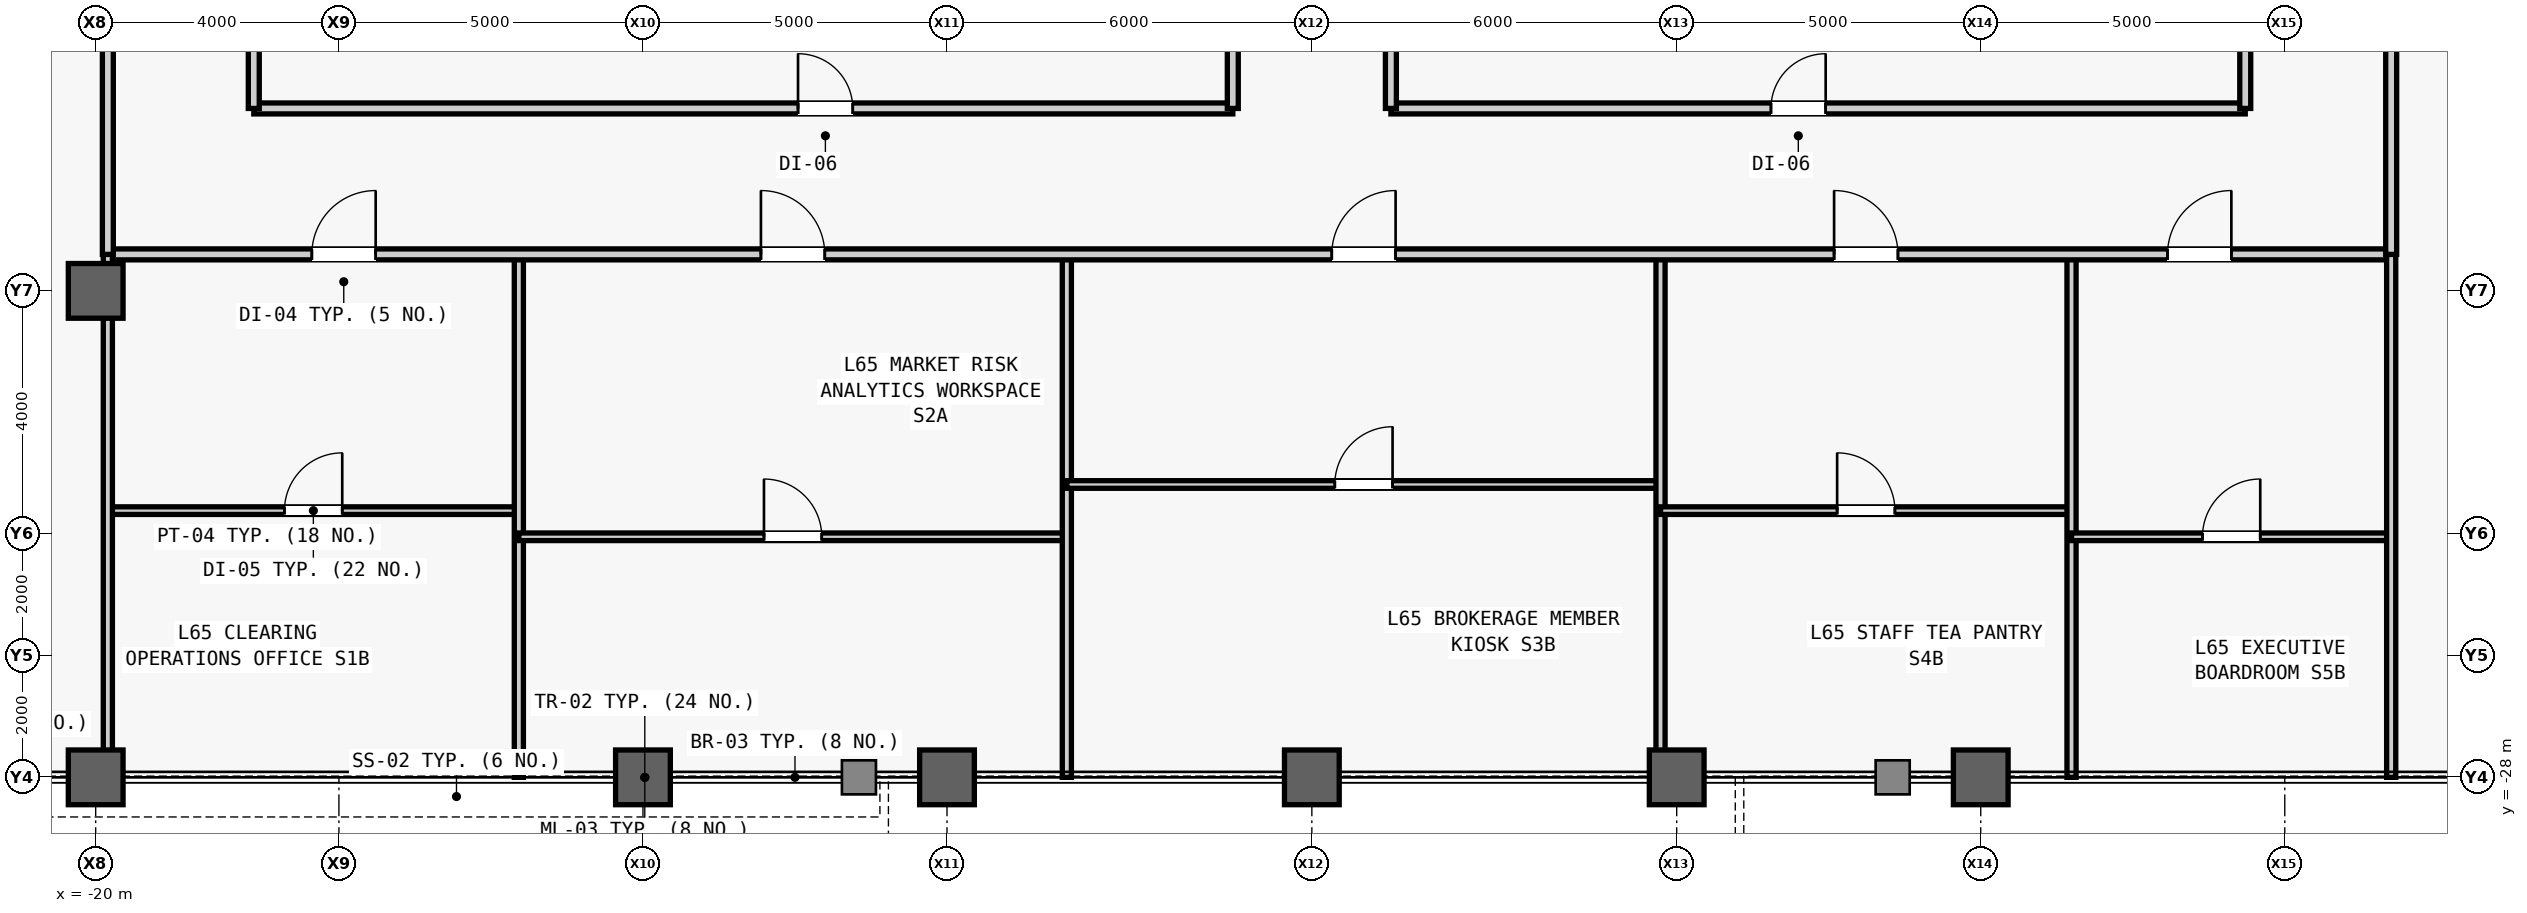
"""IFC4 building model, lengths in metres.
Left out: names, types, materials, properties, quantities, classifications, styles, units other than length and angle.
Written with IfcOpenShell. Run it as: python <this file> out.ifc"""

import sys

from ifc_helpers import new_model, si_unit, direction, frame, frame_2d, origin, origin_2d, place, context, subcontext, project, spatial, rectangle, hollow_rectangle, extrude, source, transform, mapped, element, fill, save


model = new_model("IFC4")
c1 = context("Model", 3, precision=1e-05, world=origin(), true_north=direction((0.0, 1.0)))
c2 = subcontext(c1, "Body", "Model", "MODEL_VIEW")
j1 = project(units=[si_unit("LENGTHUNIT", "METRE"), si_unit("PLANEANGLEUNIT", "RADIAN")], contexts=[c1])
p1 = place(None, origin())
s1 = spatial("IfcSite", under=j1, at=p1, CompositionType="ELEMENT")
p2 = place(p1, origin())
s2 = spatial("IfcBuilding", under=s1, at=p2, CompositionType="ELEMENT")
p3 = place(p2, frame((0.0, 0.0, 277.5)))
s3 = spatial("IfcBuildingStorey", under=s2, at=p3, CompositionType="ELEMENT", Elevation=277.5)
m1 = source(origin(), c2, "Body", "SweptSolid", [
    extrude(hollow_rectangle(XDim=0.9, YDim=0.9, WallThickness=0.05, at=origin_2d()), origin(), (0.0, 0.0, 1.0), 4.0),
])
for number, where, z_axis, x_axis in (
    (1, (-20.0, -28.0, 0.0), (0.0, 0.0, 1.0), (1.0, 0.0, 0.0)),
    (2, (-20.0, -20.0, 0.0), (0.0, 0.0, 1.0), (1.0, 0.0, 0.0)),
    (3, (-11.0, -28.0, 0.0), (0.0, 0.0, 1.0), (1.0, 0.0, 0.0)),
    (4, (-6.0, -28.0, 0.0), (0.0, 0.0, 1.0), (1.0, 0.0, 0.0)),
    (5, (0.0, -28.0, 0.0), (0.0, 0.0, 1.0), (1.0, 0.0, 0.0)),
    (6, (6.0, -28.0, 0.0), (0.0, 0.0, 1.0), (1.0, 0.0, 0.0)),
    (7, (11.0, -28.0, 0.0), (0.0, 0.0, 1.0), (1.0, 0.0, 0.0)),
):
    element("IfcColumn", number, at=place(p3, frame(where, z_axis=z_axis, x_axis=x_axis)), inside=s3, PredefinedType="COLUMN", context=c2, shape_type="MappedRepresentation", body=[
        mapped(m1, transform((0.0, 0.0, 0.0), scale=1.0)),
    ])
m2 = source(origin(), c2, "Body", "SweptSolid", [
    extrude(rectangle(XDim=16.1, YDim=0.18, at=frame_2d((8.05, 0.0))), origin(), (0.0, 0.0, 1.0), 3.78),
])
p4 = place(p3, frame((-17.4, -17.0, 0.0), z_axis=(0.0, 0.0, 1.0), x_axis=(1.0, 0.0, 0.0)))
e8 = element("IfcWall", 8, at=p4, inside=s3, PredefinedType="PARTITIONING", context=c2, shape_type="MappedRepresentation", body=[
    mapped(m2, transform((0.0, 0.0, 0.0), scale=1.0)),
])
m3 = source(origin(), c2, "Body", "SweptSolid", [
    extrude(rectangle(XDim=0.9, YDim=2.15, at=frame_2d((0.45, 1.075))), frame((0.0, 0.1, 0.0), z_axis=(0.0, -1.0, 0.0), x_axis=(1.0, 0.0, 0.0)), (0.0, 0.0, 1.0), 0.2),
])
p5 = place(p4, frame((8.95, 0.0, 0.0)))
e9 = element("IfcOpeningElement", 9, at=p5, cuts=e8, PredefinedType="OPENING", context=c2, shape_type="MappedRepresentation", body=[
    mapped(m3, transform((0.0, 0.0, 0.0), scale=1.0)),
])
m4 = source(origin(), c2, "Body", "SweptSolid", [
    extrude(rectangle(XDim=7.2, YDim=0.18, at=frame_2d((3.6, 0.0))), origin(), (0.0, 0.0, 1.0), 3.78),
])
p6 = place(p3, frame((-17.4, -17.0, 0.0), z_axis=(0.0, 0.0, 1.0), x_axis=(0.0, 1.0, 0.0)))
e10 = element("IfcWall", 10, at=p6, inside=s3, PredefinedType="PARTITIONING", context=c2, shape_type="MappedRepresentation", body=[
    mapped(m4, transform((0.0, 0.0, 0.0), scale=1.0)),
])
m5 = source(origin(), c2, "Body", "SweptSolid", [
    extrude(rectangle(XDim=6.0, YDim=0.18, at=frame_2d((3.0, 0.0))), origin(), (0.0, 0.0, 1.0), 3.78),
])
p7 = place(p3, frame((-1.3, -17.0, 0.0), z_axis=(0.0, 0.0, 1.0), x_axis=(0.0, 1.0, 0.0)))
e11 = element("IfcWall", 11, at=p7, inside=s3, PredefinedType="PARTITIONING", context=c2, shape_type="MappedRepresentation", body=[
    mapped(m5, transform((0.0, 0.0, 0.0), scale=1.0)),
])
m6 = source(origin(), c2, "Body", "SweptSolid", [
    extrude(rectangle(XDim=14.05, YDim=0.18, at=frame_2d((7.025, 0.0))), origin(), (0.0, 0.0, 1.0), 3.78),
])
p8 = place(p3, frame((1.3, -17.0, 0.0), z_axis=(0.0, 0.0, 1.0), x_axis=(1.0, 0.0, 0.0)))
e12 = element("IfcWall", 12, at=p8, inside=s3, PredefinedType="PARTITIONING", context=c2, shape_type="MappedRepresentation", body=[
    mapped(m6, transform((0.0, 0.0, 0.0), scale=1.0)),
])
p9 = place(p8, frame((6.25, 0.0, 0.0)))
e13 = element("IfcOpeningElement", 13, at=p9, cuts=e12, PredefinedType="OPENING", context=c2, shape_type="MappedRepresentation", body=[
    mapped(m3, transform((0.0, 0.0, 0.0), scale=1.0)),
])
p10 = place(p3, frame((1.3, -17.0, 0.0), z_axis=(0.0, 0.0, 1.0), x_axis=(0.0, 1.0, 0.0)))
e14 = element("IfcWall", 14, at=p10, inside=s3, PredefinedType="PARTITIONING", context=c2, shape_type="MappedRepresentation", body=[
    mapped(m5, transform((0.0, 0.0, 0.0), scale=1.0)),
])
m7 = source(origin(), c2, "Body", "SweptSolid", [
    extrude(rectangle(XDim=6.5, YDim=0.18, at=frame_2d((3.25, 0.0))), origin(), (0.0, 0.0, 1.0), 3.78),
])
p11 = place(p3, frame((15.35, -17.0, 0.0), z_axis=(0.0, 0.0, 1.0), x_axis=(0.0, 1.0, 0.0)))
e15 = element("IfcWall", 15, at=p11, inside=s3, PredefinedType="PARTITIONING", context=c2, shape_type="MappedRepresentation", body=[
    mapped(m7, transform((0.0, 0.0, 0.0), scale=1.0)),
])
m8 = source(origin(), c2, "Body", "SweptSolid", [
    extrude(rectangle(XDim=6.759, YDim=0.125, at=frame_2d((3.379, 0.0))), origin(), (0.0, 0.0, 1.0), 3.78),
])
p12 = place(p3, frame((-19.8, -23.614, 0.0), z_axis=(0.0, 0.0, 1.0), x_axis=(1.0, 0.0, 0.0)))
e16 = element("IfcWall", 16, at=p12, inside=s3, PredefinedType="PARTITIONING", context=c2, shape_type="MappedRepresentation", body=[
    mapped(m8, transform((0.0, 0.0, 0.0), scale=1.0)),
])
m9 = source(origin(), c2, "Body", "SweptSolid", [
    extrude(rectangle(XDim=0.95, YDim=2.15, at=frame_2d((0.475, 1.075))), frame((0.0, 0.073, 0.0), z_axis=(0.0, -1.0, 0.0), x_axis=(1.0, 0.0, 0.0)), (0.0, 0.0, 1.0), 0.145),
])
p13 = place(p12, frame((2.905, 0.0, 0.0)))
e17 = element("IfcOpeningElement", 17, at=p13, cuts=e16, PredefinedType="OPENING", context=c2, shape_type="MappedRepresentation", body=[
    mapped(m9, transform((0.0, 0.0, 0.0), scale=1.0)),
])
m10 = source(origin(), c2, "Body", "SweptSolid", [
    extrude(rectangle(XDim=8.6, YDim=0.15, at=frame_2d((4.3, 0.0))), origin(), (0.0, 0.0, 1.0), 3.78),
])
p14 = place(p3, frame((-13.041, -28.0, 0.0), z_axis=(0.0, 0.0, 1.0), x_axis=(0.0, 1.0, 0.0)))
e18 = element("IfcWall", 18, at=p14, inside=s3, PredefinedType="PARTITIONING", context=c2, shape_type="MappedRepresentation", body=[
    mapped(m10, transform((0.0, 0.0, 0.0), scale=1.0)),
])
m11 = source(origin(), c2, "Body", "SweptSolid", [
    extrude(rectangle(XDim=9.012, YDim=0.125, at=frame_2d((4.506, 0.0))), origin(), (0.0, 0.0, 1.0), 3.78),
])
p15 = place(p3, frame((-13.041, -24.044, 0.0), z_axis=(0.0, 0.0, 1.0), x_axis=(1.0, 0.0, 0.0)))
e19 = element("IfcWall", 19, at=p15, inside=s3, PredefinedType="PARTITIONING", context=c2, shape_type="MappedRepresentation", body=[
    mapped(m11, transform((0.0, 0.0, 0.0), scale=1.0)),
])
p16 = place(p15, frame((4.031, 0.0, 0.0)))
e20 = element("IfcOpeningElement", 20, at=p16, cuts=e19, PredefinedType="OPENING", context=c2, shape_type="MappedRepresentation", body=[
    mapped(m9, transform((0.0, 0.0, 0.0), scale=1.0)),
])
p17 = place(p3, frame((-4.029, -28.0, 0.0), z_axis=(0.0, 0.0, 1.0), x_axis=(0.0, 1.0, 0.0)))
e21 = element("IfcWall", 21, at=p17, inside=s3, PredefinedType="PARTITIONING", context=c2, shape_type="MappedRepresentation", body=[
    mapped(m10, transform((0.0, 0.0, 0.0), scale=1.0)),
])
m12 = source(origin(), c2, "Body", "SweptSolid", [
    extrude(rectangle(XDim=9.763, YDim=0.125, at=frame_2d((4.881, 0.0))), origin(), (0.0, 0.0, 1.0), 3.78),
])
p18 = place(p3, frame((-4.029, -23.184, 0.0), z_axis=(0.0, 0.0, 1.0), x_axis=(1.0, 0.0, 0.0)))
e22 = element("IfcWall", 22, at=p18, inside=s3, PredefinedType="PARTITIONING", context=c2, shape_type="MappedRepresentation", body=[
    mapped(m12, transform((0.0, 0.0, 0.0), scale=1.0)),
])
p19 = place(p18, frame((4.406, 0.0, 0.0)))
e23 = element("IfcOpeningElement", 23, at=p19, cuts=e22, PredefinedType="OPENING", context=c2, shape_type="MappedRepresentation", body=[
    mapped(m9, transform((0.0, 0.0, 0.0), scale=1.0)),
])
m13 = source(origin(), c2, "Body", "SweptSolid", [
    extrude(rectangle(XDim=8.6, YDim=0.15, at=frame_2d((4.3, 0.0))), origin(), (0.0, 0.0, 1.0), 3.085),
])
p20 = place(p3, frame((5.734, -28.0, 0.0), z_axis=(0.0, 0.0, 1.0), x_axis=(0.0, 1.0, 0.0)))
e24 = element("IfcWall", 24, at=p20, inside=s3, PredefinedType="PARTITIONING", context=c2, shape_type="MappedRepresentation", body=[
    mapped(m13, transform((0.0, 0.0, 0.0), scale=1.0)),
])
p21 = place(p3, frame((5.734, -23.614, 0.0), z_axis=(0.0, 0.0, 1.0), x_axis=(1.0, 0.0, 0.0)))
e25 = element("IfcWall", 25, at=p21, inside=s3, PredefinedType="PARTITIONING", context=c2, shape_type="MappedRepresentation", body=[
    mapped(m8, transform((0.0, 0.0, 0.0), scale=1.0)),
])
p22 = place(p21, frame((2.905, 0.0, 0.0)))
e26 = element("IfcOpeningElement", 26, at=p22, cuts=e25, PredefinedType="OPENING", context=c2, shape_type="MappedRepresentation", body=[
    mapped(m9, transform((0.0, 0.0, 0.0), scale=1.0)),
])
p23 = place(p3, frame((12.493, -28.0, 0.0), z_axis=(0.0, 0.0, 1.0), x_axis=(0.0, 1.0, 0.0)))
e27 = element("IfcWall", 27, at=p23, inside=s3, PredefinedType="PARTITIONING", context=c2, shape_type="MappedRepresentation", body=[
    mapped(m10, transform((0.0, 0.0, 0.0), scale=1.0)),
])
m14 = source(origin(), c2, "Body", "SweptSolid", [
    extrude(rectangle(XDim=5.257, YDim=0.125, at=frame_2d((2.628, 0.0))), origin(), (0.0, 0.0, 1.0), 3.78),
])
p24 = place(p3, frame((12.493, -24.044, 0.0), z_axis=(0.0, 0.0, 1.0), x_axis=(1.0, 0.0, 0.0)))
e28 = element("IfcWall", 28, at=p24, inside=s3, PredefinedType="PARTITIONING", context=c2, shape_type="MappedRepresentation", body=[
    mapped(m14, transform((0.0, 0.0, 0.0), scale=1.0)),
])
p25 = place(p24, frame((2.154, 0.0, 0.0)))
e29 = element("IfcOpeningElement", 29, at=p25, cuts=e28, PredefinedType="OPENING", context=c2, shape_type="MappedRepresentation", body=[
    mapped(m9, transform((0.0, 0.0, 0.0), scale=1.0)),
])
m15 = source(origin(), c2, "Body", "SweptSolid", [
    extrude(rectangle(XDim=37.55, YDim=0.18, at=frame_2d((18.775, 0.0))), origin(), (0.0, 0.0, 1.0), 3.433),
])
p26 = place(p3, frame((-19.8, -19.4, 0.0), z_axis=(0.0, 0.0, 1.0), x_axis=(1.0, 0.0, 0.0)))
e30 = element("IfcWall", 30, at=p26, inside=s3, PredefinedType="PARTITIONING", context=c2, shape_type="MappedRepresentation", body=[
    mapped(m15, transform((0.0, 0.0, 0.0), scale=1.0)),
])
m16 = source(origin(), c2, "Body", "SweptSolid", [
    extrude(rectangle(XDim=1.05, YDim=2.2, at=frame_2d((0.525, 1.1))), frame((0.0, 0.1, 0.0), z_axis=(0.0, -1.0, 0.0), x_axis=(1.0, 0.0, 0.0)), (0.0, 0.0, 1.0), 0.2),
])
p27 = place(p26, frame((3.354, 0.0, 0.0)))
e31 = element("IfcOpeningElement", 31, at=p27, cuts=e30, PredefinedType="OPENING", context=c2, shape_type="MappedRepresentation", body=[
    mapped(m16, transform((0.0, 0.0, 0.0), scale=1.0)),
])
p28 = place(p26, frame((10.74, 0.0, 0.0)))
e32 = element("IfcOpeningElement", 32, at=p28, cuts=e30, PredefinedType="OPENING", context=c2, shape_type="MappedRepresentation", body=[
    mapped(m16, transform((0.0, 0.0, 0.0), scale=1.0)),
])
p29 = place(p26, frame((20.127, 0.0, 0.0)))
e33 = element("IfcOpeningElement", 33, at=p29, cuts=e30, PredefinedType="OPENING", context=c2, shape_type="MappedRepresentation", body=[
    mapped(m16, transform((0.0, 0.0, 0.0), scale=1.0)),
])
p30 = place(p26, frame((28.388, 0.0, 0.0)))
e34 = element("IfcOpeningElement", 34, at=p30, cuts=e30, PredefinedType="OPENING", context=c2, shape_type="MappedRepresentation", body=[
    mapped(m16, transform((0.0, 0.0, 0.0), scale=1.0)),
])
p31 = place(p26, frame((33.872, 0.0, 0.0)))
e35 = element("IfcOpeningElement", 35, at=p31, cuts=e30, PredefinedType="OPENING", context=c2, shape_type="MappedRepresentation", body=[
    mapped(m16, transform((0.0, 0.0, 0.0), scale=1.0)),
])
m17 = source(origin(), c2, "Body", "SweptSolid", [
    extrude(rectangle(XDim=8.6, YDim=0.15, at=frame_2d((4.3, 0.0))), origin(), (0.0, 0.0, 1.0), 3.164),
])
p32 = place(p3, frame((-19.8, -28.0, 0.0), z_axis=(0.0, 0.0, 1.0), x_axis=(0.0, 1.0, 0.0)))
e36 = element("IfcWall", 36, at=p32, inside=s3, PredefinedType="PARTITIONING", context=c2, shape_type="MappedRepresentation", body=[
    mapped(m17, transform((0.0, 0.0, 0.0), scale=1.0)),
])
p33 = place(p3, frame((17.75, -28.0, 0.0), z_axis=(0.0, 0.0, 1.0), x_axis=(0.0, 1.0, 0.0)))
e37 = element("IfcWall", 37, at=p33, inside=s3, PredefinedType="PARTITIONING", context=c2, shape_type="MappedRepresentation", body=[
    mapped(m10, transform((0.0, 0.0, 0.0), scale=1.0)),
])
m18 = source(origin(), c2, "Body", "SweptSolid", [
    extrude(rectangle(XDim=41.9, YDim=0.18, at=frame_2d((20.95, 0.0))), origin(), (0.0, 0.0, 1.0), 3.164),
])
p34 = place(p3, frame((-19.8, -19.4, 0.0), z_axis=(0.0, 0.0, 1.0), x_axis=(0.0, 1.0, 0.0)))
e38 = element("IfcWall", 38, at=p34, inside=s3, PredefinedType="PARTITIONING", context=c2, shape_type="MappedRepresentation", body=[
    mapped(m18, transform((0.0, 0.0, 0.0), scale=1.0)),
])
m19 = source(origin(), c2, "Body", "SweptSolid", [
    extrude(rectangle(XDim=0.95, YDim=2.15, at=frame_2d((0.475, 1.075))), frame((0.0, 0.1, 0.0), z_axis=(0.0, -1.0, 0.0), x_axis=(1.0, 0.0, 0.0)), (0.0, 0.0, 1.0), 0.2),
])
p35 = place(p34, frame((10.375, 0.0, 0.0)))
e39 = element("IfcOpeningElement", 39, at=p35, cuts=e38, PredefinedType="OPENING", context=c2, shape_type="MappedRepresentation", body=[
    mapped(m19, transform((0.0, 0.0, 0.0), scale=1.0)),
])
p36 = place(p34, frame((26.075, 0.0, 0.0)))
e40 = element("IfcOpeningElement", 40, at=p36, cuts=e38, PredefinedType="OPENING", context=c2, shape_type="MappedRepresentation", body=[
    mapped(m19, transform((0.0, 0.0, 0.0), scale=1.0)),
])
m20 = source(origin(), c2, "Body", "SweptSolid", [
    extrude(rectangle(XDim=41.9, YDim=0.18, at=frame_2d((20.95, 0.0))), origin(), (0.0, 0.0, 1.0), 3.78),
])
p37 = place(p3, frame((17.75, -19.4, 0.0), z_axis=(0.0, 0.0, 1.0), x_axis=(0.0, 1.0, 0.0)))
e41 = element("IfcWall", 41, at=p37, inside=s3, PredefinedType="PARTITIONING", context=c2, shape_type="MappedRepresentation", body=[
    mapped(m20, transform((0.0, 0.0, 0.0), scale=1.0)),
])
p38 = place(p37, frame((5.591, 0.0, 0.0)))
e42 = element("IfcOpeningElement", 42, at=p38, cuts=e41, PredefinedType="OPENING", context=c2, shape_type="MappedRepresentation", body=[
    mapped(m19, transform((0.0, 0.0, 0.0), scale=1.0)),
])
p39 = place(p37, frame((13.247, 0.0, 0.0)))
e43 = element("IfcOpeningElement", 43, at=p39, cuts=e41, PredefinedType="OPENING", context=c2, shape_type="MappedRepresentation", body=[
    mapped(m19, transform((0.0, 0.0, 0.0), scale=1.0)),
])
p40 = place(p37, frame((22.121, 0.0, 0.0)))
e44 = element("IfcOpeningElement", 44, at=p40, cuts=e41, PredefinedType="OPENING", context=c2, shape_type="MappedRepresentation", body=[
    mapped(m19, transform((0.0, 0.0, 0.0), scale=1.0)),
])
p41 = place(p37, frame((29.165, 0.0, 0.0)))
e45 = element("IfcOpeningElement", 45, at=p41, cuts=e41, PredefinedType="OPENING", context=c2, shape_type="MappedRepresentation", body=[
    mapped(m19, transform((0.0, 0.0, 0.0), scale=1.0)),
])
m21 = source(origin(), c2, "Body", "SweptSolid", [
    extrude(rectangle(XDim=0.9, YDim=2.15, at=frame_2d((0.45, 1.075))), frame((0.0, 0.025, 0.0), z_axis=(0.0, -1.0, 0.0), x_axis=(1.0, 0.0, 0.0)), (0.0, 0.0, 1.0), 0.05),
])
p42 = place(p5, origin())
e46 = element("IfcDoor", 46, at=p42, inside=s3, OperationType="SINGLE_SWING_LEFT", PredefinedType="DOOR", context=c2, shape_type="MappedRepresentation", body=[
    mapped(m21, transform((0.0, 0.0, 0.0), scale=1.0)),
])
fill(e9, e46)
p43 = place(p9, origin())
e47 = element("IfcDoor", 47, at=p43, inside=s3, OperationType="SINGLE_SWING_RIGHT", PredefinedType="DOOR", context=c2, shape_type="MappedRepresentation", body=[
    mapped(m21, transform((0.0, 0.0, 0.0), scale=1.0)),
])
fill(e13, e47)
m22 = source(origin(), c2, "Body", "SweptSolid", [
    extrude(rectangle(XDim=0.95, YDim=2.15, at=frame_2d((0.475, 1.075))), frame((0.0, 0.025, 0.0), z_axis=(0.0, -1.0, 0.0), x_axis=(1.0, 0.0, 0.0)), (0.0, 0.0, 1.0), 0.05),
])
p44 = place(p13, origin())
e48 = element("IfcDoor", 48, at=p44, inside=s3, OperationType="SINGLE_SWING_RIGHT", PredefinedType="DOOR", context=c2, shape_type="MappedRepresentation", body=[
    mapped(m22, transform((0.0, 0.0, 0.0), scale=1.0)),
])
fill(e17, e48)
p45 = place(p16, origin())
e49 = element("IfcDoor", 49, at=p45, inside=s3, OperationType="SINGLE_SWING_LEFT", PredefinedType="DOOR", context=c2, shape_type="MappedRepresentation", body=[
    mapped(m22, transform((0.0, 0.0, 0.0), scale=1.0)),
])
fill(e20, e49)
p46 = place(p19, origin())
e50 = element("IfcDoor", 50, at=p46, inside=s3, OperationType="SINGLE_SWING_RIGHT", PredefinedType="DOOR", context=c2, shape_type="MappedRepresentation", body=[
    mapped(m22, transform((0.0, 0.0, 0.0), scale=1.0)),
])
fill(e23, e50)
p47 = place(p22, origin())
e51 = element("IfcDoor", 51, at=p47, inside=s3, OperationType="SINGLE_SWING_LEFT", PredefinedType="DOOR", context=c2, shape_type="MappedRepresentation", body=[
    mapped(m22, transform((0.0, 0.0, 0.0), scale=1.0)),
])
fill(e26, e51)
p48 = place(p25, origin())
e52 = element("IfcDoor", 52, at=p48, inside=s3, OperationType="SINGLE_SWING_RIGHT", PredefinedType="DOOR", context=c2, shape_type="MappedRepresentation", body=[
    mapped(m22, transform((0.0, 0.0, 0.0), scale=1.0)),
])
fill(e29, e52)
m23 = source(origin(), c2, "Body", "SweptSolid", [
    extrude(rectangle(XDim=1.05, YDim=2.2, at=frame_2d((0.525, 1.1))), frame((0.0, 0.025, 0.0), z_axis=(0.0, -1.0, 0.0), x_axis=(1.0, 0.0, 0.0)), (0.0, 0.0, 1.0), 0.05),
])
p49 = place(p27, origin())
e53 = element("IfcDoor", 53, at=p49, inside=s3, OperationType="SINGLE_SWING_RIGHT", PredefinedType="DOOR", context=c2, shape_type="MappedRepresentation", body=[
    mapped(m23, transform((0.0, 0.0, 0.0), scale=1.0)),
])
fill(e31, e53)
p50 = place(p28, origin())
e54 = element("IfcDoor", 54, at=p50, inside=s3, OperationType="SINGLE_SWING_LEFT", PredefinedType="DOOR", context=c2, shape_type="MappedRepresentation", body=[
    mapped(m23, transform((0.0, 0.0, 0.0), scale=1.0)),
])
fill(e32, e54)
p51 = place(p29, origin())
e55 = element("IfcDoor", 55, at=p51, inside=s3, OperationType="SINGLE_SWING_RIGHT", PredefinedType="DOOR", context=c2, shape_type="MappedRepresentation", body=[
    mapped(m23, transform((0.0, 0.0, 0.0), scale=1.0)),
])
fill(e33, e55)
p52 = place(p30, origin())
e56 = element("IfcDoor", 56, at=p52, inside=s3, OperationType="SINGLE_SWING_LEFT", PredefinedType="DOOR", context=c2, shape_type="MappedRepresentation", body=[
    mapped(m23, transform((0.0, 0.0, 0.0), scale=1.0)),
])
fill(e34, e56)
p53 = place(p31, origin())
e57 = element("IfcDoor", 57, at=p53, inside=s3, OperationType="SINGLE_SWING_RIGHT", PredefinedType="DOOR", context=c2, shape_type="MappedRepresentation", body=[
    mapped(m23, transform((0.0, 0.0, 0.0), scale=1.0)),
])
fill(e35, e57)
save(model, sys.argv[1])
